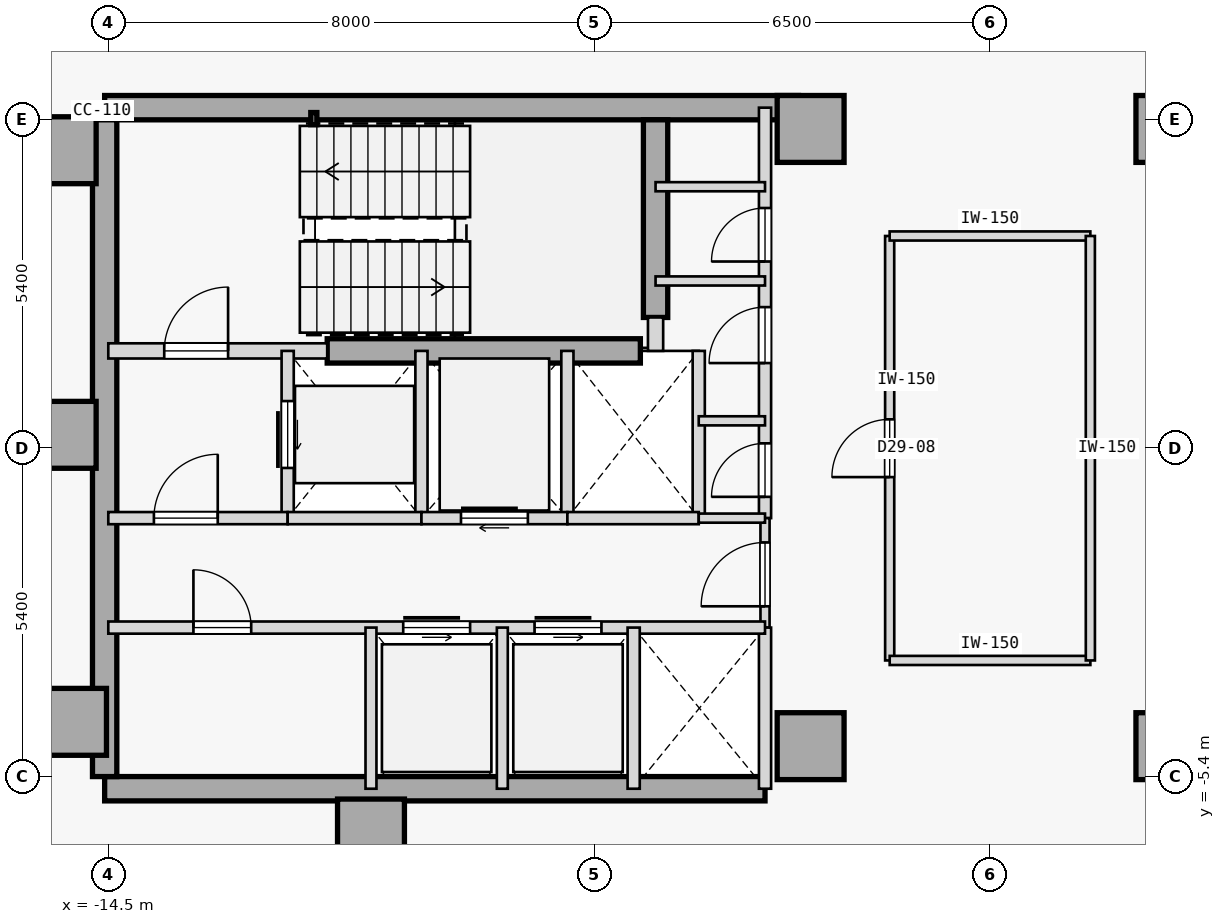
"""IFC4 building model, lengths in metres.
Left out: names, types, materials, properties, quantities, classifications, styles, units other than length and angle.
Written with IfcOpenShell. Run it as: python <this file> out.ifc"""

import sys

from ifc_helpers import new_model, si_unit, direction, frame, frame_2d, origin, origin_2d, place, context, subcontext, project, spatial, rectangle, hollow_rectangle, extrude, element, fill, save


model = new_model("IFC4")
c1 = context("Model", 3, precision=1e-05, world=origin(), true_north=direction((0.0, 1.0)))
c2 = subcontext(c1, "Body", "Model", "MODEL_VIEW")
j1 = project(units=[si_unit("LENGTHUNIT", "METRE"), si_unit("PLANEANGLEUNIT", "RADIAN")], contexts=[c1])
p1 = place(None, origin())
s1 = spatial("IfcSite", under=j1, at=p1, CompositionType="ELEMENT")
p2 = place(p1, origin())
s2 = spatial("IfcBuilding", under=s1, at=p2, CompositionType="ELEMENT")
p3 = place(p2, frame((0.0, 0.0, 117.0)))
s3 = spatial("IfcBuildingStorey", under=s2, at=p3, CompositionType="ELEMENT", Elevation=117.0)
for number, where, z_axis, x_axis in (
    (1, (-15.25, 4.9, 0.0), (0.0, 0.0, 1.0), (1.0, 0.0, 0.0)),
    (2, (-15.25, 0.22, 0.0), (0.0, 0.0, 1.0), (1.0, 0.0, 0.0)),
    (3, (-15.08, -4.5, 0.0), (0.0, 0.0, 1.0), (1.0, 0.0, 0.0)),
    (4, (-10.18, -6.32, 0.0), (0.0, 0.0, 1.0), (1.0, 0.0, 0.0)),
    (5, (-2.95, -4.9, 0.0), (0.0, 0.0, 1.0), (1.0, 0.0, 0.0)),
    (6, (-2.95, 5.25, 0.0), (0.0, 0.0, 1.0), (1.0, 0.0, 0.0)),
    (7, (2.95, -4.9, 0.0), (0.0, 0.0, 1.0), (1.0, 0.0, 0.0)),
    (8, (2.95, 5.25, 0.0), (0.0, 0.0, 1.0), (1.0, 0.0, 0.0)),
):
    element("IfcColumn", number, at=place(p3, frame(where, z_axis=z_axis, x_axis=x_axis)), inside=s3, PredefinedType="COLUMN", context=c2, shape_type="SweptSolid", body=[
        extrude(rectangle(XDim=1.1, YDim=1.1, at=origin_2d()), origin(), (0.0, 0.0, 1.0), 3.7),
    ])
p4 = place(p3, frame((-14.56, 5.6, 0.0), z_axis=(0.0, 0.0, 1.0), x_axis=(1.0, 0.0, 0.0)))
e9 = element("IfcWall", 9, at=p4, inside=s3, PredefinedType="SHEAR", context=c2, shape_type="SweptSolid", body=[
    extrude(rectangle(XDim=11.41, YDim=0.4, at=frame_2d((5.705, 0.0))), origin(), (0.0, 0.0, 1.0), 3.475),
])
p5 = place(p3, frame((-14.56, -5.6, 0.0), z_axis=(0.0, 0.0, 1.0), x_axis=(1.0, 0.0, 0.0)))
e10 = element("IfcWall", 10, at=p5, inside=s3, PredefinedType="SHEAR", context=c2, shape_type="SweptSolid", body=[
    extrude(rectangle(XDim=10.86, YDim=0.4, at=frame_2d((5.43, 0.0))), origin(), (0.0, 0.0, 1.0), 3.475),
])
p6 = place(p3, frame((-14.56, -5.4, 0.0), z_axis=(0.0, 0.0, 1.0), x_axis=(0.0, 1.0, 0.0)))
e11 = element("IfcWall", 11, at=p6, inside=s3, PredefinedType="SHEAR", context=c2, shape_type="SweptSolid", body=[
    extrude(rectangle(XDim=10.8, YDim=0.4, at=frame_2d((5.4, 0.0))), origin(), (0.0, 0.0, 1.0), 3.475),
])
p7 = place(p3, frame((-5.5, 2.15, 0.0), z_axis=(0.0, 0.0, 1.0), x_axis=(0.0, 1.0, 0.0)))
e12 = element("IfcWall", 12, at=p7, inside=s3, PredefinedType="SHEAR", context=c2, shape_type="SweptSolid", body=[
    extrude(rectangle(XDim=3.25, YDim=0.4, at=frame_2d((1.625, 0.0))), origin(), (0.0, 0.0, 1.0), 3.475),
])
p8 = place(p3, frame((-10.9, 1.6, 0.0), z_axis=(0.0, 0.0, 1.0), x_axis=(1.0, 0.0, 0.0)))
e13 = element("IfcWall", 13, at=p8, inside=s3, PredefinedType="SHEAR", context=c2, shape_type="SweptSolid", body=[
    extrude(rectangle(XDim=5.15, YDim=0.4, at=frame_2d((2.575, 0.0))), origin(), (0.0, 0.0, 1.0), 3.475),
])
p9 = place(p3, frame((-11.12, 5.42, 0.0), z_axis=(0.0, 0.0, 1.0), x_axis=(1.0, 0.0, 0.0)))
e14 = element("IfcColumn", 14, at=p9, inside=s3, PredefinedType="COLUMN", context=c2, shape_type="SweptSolid", body=[
    extrude(hollow_rectangle(XDim=0.1, YDim=0.2, WallThickness=0.008, at=origin_2d()), origin(), (0.0, 0.0, 1.0), 3.7),
])
p10 = place(p3, frame((-14.5, 1.6, 0.0), z_axis=(0.0, 0.0, 1.0), x_axis=(1.0, 0.0, 0.0)))
e15 = element("IfcWall", 15, at=p10, inside=s3, PredefinedType="STANDARD", context=c2, shape_type="SweptSolid", body=[
    extrude(rectangle(XDim=3.6, YDim=0.25, at=frame_2d((1.8, 0.0))), origin(), (0.0, 0.0, 1.0), 3.475),
])
p11 = place(p10, frame((0.92, 0.0, 0.0)))
e16 = element("IfcOpeningElement", 16, at=p11, cuts=e15, PredefinedType="OPENING", context=c2, shape_type="SweptSolid", body=[
    extrude(rectangle(XDim=1.05, YDim=2.15, at=frame_2d((0.525, 1.075))), frame((0.0, 0.135, 0.0), z_axis=(0.0, -1.0, 0.0), x_axis=(1.0, 0.0, 0.0)), (0.0, 0.0, 1.0), 0.27),
])
p12 = place(p3, frame((-5.5, 1.6, 0.0), z_axis=(0.0, 0.0, 1.0), x_axis=(0.0, 1.0, 0.0)))
e17 = element("IfcWall", 17, at=p12, inside=s3, PredefinedType="STANDARD", context=c2, shape_type="SweptSolid", body=[
    extrude(rectangle(XDim=0.55, YDim=0.25, at=frame_2d((0.275, 0.0))), origin(), (0.0, 0.0, 1.0), 3.475),
])
p13 = place(p3, frame((-3.7, -1.15, 0.0), z_axis=(0.0, 0.0, 1.0), x_axis=(0.0, 1.0, 0.0)))
e18 = element("IfcWall", 18, at=p13, inside=s3, PredefinedType="STANDARD", context=c2, shape_type="SweptSolid", body=[
    extrude(rectangle(XDim=6.75, YDim=0.2, at=frame_2d((3.375, 0.0))), origin(), (0.0, 0.0, 1.0), 3.475),
])
p14 = place(p13, frame((0.35, 0.0, 0.0)))
e19 = element("IfcOpeningElement", 19, at=p14, cuts=e18, PredefinedType="OPENING", context=c2, shape_type="SweptSolid", body=[
    extrude(rectangle(XDim=0.88, YDim=2.15, at=frame_2d((0.44, 1.075))), frame((0.0, 0.11, 0.0), z_axis=(0.0, -1.0, 0.0), x_axis=(1.0, 0.0, 0.0)), (0.0, 0.0, 1.0), 0.22),
])
p15 = place(p13, frame((2.55, 0.0, 0.0)))
e20 = element("IfcOpeningElement", 20, at=p15, cuts=e18, PredefinedType="OPENING", context=c2, shape_type="SweptSolid", body=[
    extrude(rectangle(XDim=0.92, YDim=2.15, at=frame_2d((0.46, 1.075))), frame((0.0, 0.11, 0.0), z_axis=(0.0, -1.0, 0.0), x_axis=(1.0, 0.0, 0.0)), (0.0, 0.0, 1.0), 0.22),
])
p16 = place(p13, frame((4.22, 0.0, 0.0)))
e21 = element("IfcOpeningElement", 21, at=p16, cuts=e18, PredefinedType="OPENING", context=c2, shape_type="SweptSolid", body=[
    extrude(rectangle(XDim=0.88, YDim=2.15, at=frame_2d((0.44, 1.075))), frame((0.0, 0.11, 0.0), z_axis=(0.0, -1.0, 0.0), x_axis=(1.0, 0.0, 0.0)), (0.0, 0.0, 1.0), 0.22),
])
p17 = place(p3, frame((-3.7, -2.95, 0.0), z_axis=(0.0, 0.0, 1.0), x_axis=(0.0, 1.0, 0.0)))
e22 = element("IfcWall", 22, at=p17, inside=s3, PredefinedType="PARTITIONING", context=c2, shape_type="SweptSolid", body=[
    extrude(rectangle(XDim=1.8, YDim=0.15, at=frame_2d((0.9, 0.0))), origin(), (0.0, 0.0, 1.0), 3.475),
])
p18 = place(p17, frame((0.35, 0.0, 0.0)))
e23 = element("IfcOpeningElement", 23, at=p18, cuts=e22, PredefinedType="OPENING", context=c2, shape_type="SweptSolid", body=[
    extrude(rectangle(XDim=1.05, YDim=2.18, at=frame_2d((0.525, 1.09))), frame((0.0, 0.085, 0.0), z_axis=(0.0, -1.0, 0.0), x_axis=(1.0, 0.0, 0.0)), (0.0, 0.0, 1.0), 0.17),
])
p19 = place(p3, frame((-3.7, -5.6, 0.0), z_axis=(0.0, 0.0, 1.0), x_axis=(0.0, 1.0, 0.0)))
e24 = element("IfcWall", 24, at=p19, inside=s3, PredefinedType="STANDARD", context=c2, shape_type="SweptSolid", body=[
    extrude(rectangle(XDim=2.65, YDim=0.2, at=frame_2d((1.325, 0.0))), origin(), (0.0, 0.0, 1.0), 3.475),
])
p20 = place(p3, frame((-11.55, -1.15, 0.0), z_axis=(0.0, 0.0, 1.0), x_axis=(0.0, 1.0, 0.0)))
e25 = element("IfcWall", 25, at=p20, inside=s3, PredefinedType="STANDARD", context=c2, shape_type="SweptSolid", body=[
    extrude(rectangle(XDim=2.75, YDim=0.2, at=frame_2d((1.375, 0.0))), origin(), (0.0, 0.0, 1.0), 3.475),
])
p21 = place(p20, frame((0.825, 0.0, 0.0)))
e26 = element("IfcOpeningElement", 26, at=p21, cuts=e25, PredefinedType="OPENING", context=c2, shape_type="SweptSolid", body=[
    extrude(rectangle(XDim=1.1, YDim=2.15, at=frame_2d((0.55, 1.075))), frame((0.0, 0.11, 0.0), z_axis=(0.0, -1.0, 0.0), x_axis=(1.0, 0.0, 0.0)), (0.0, 0.0, 1.0), 0.22),
])
p22 = place(p3, frame((-9.35, -1.15, 0.0), z_axis=(0.0, 0.0, 1.0), x_axis=(0.0, 1.0, 0.0)))
e27 = element("IfcWall", 27, at=p22, inside=s3, PredefinedType="STANDARD", context=c2, shape_type="SweptSolid", body=[
    extrude(rectangle(XDim=2.75, YDim=0.2, at=frame_2d((1.375, 0.0))), origin(), (0.0, 0.0, 1.0), 3.475),
])
p23 = place(p3, frame((-14.5, -1.15, 0.0), z_axis=(0.0, 0.0, 1.0), x_axis=(1.0, 0.0, 0.0)))
e28 = element("IfcWall", 28, at=p23, inside=s3, PredefinedType="STANDARD", context=c2, shape_type="SweptSolid", body=[
    extrude(rectangle(XDim=2.95, YDim=0.2, at=frame_2d((1.475, 0.0))), origin(), (0.0, 0.0, 1.0), 3.475),
])
p24 = place(p23, frame((0.75, 0.0, 0.0)))
e29 = element("IfcOpeningElement", 29, at=p24, cuts=e28, PredefinedType="OPENING", context=c2, shape_type="SweptSolid", body=[
    extrude(rectangle(XDim=1.05, YDim=2.18, at=frame_2d((0.525, 1.09))), frame((0.0, 0.11, 0.0), z_axis=(0.0, -1.0, 0.0), x_axis=(1.0, 0.0, 0.0)), (0.0, 0.0, 1.0), 0.22),
])
p25 = place(p3, frame((-11.55, -1.15, 0.0), z_axis=(0.0, 0.0, 1.0), x_axis=(1.0, 0.0, 0.0)))
e30 = element("IfcWall", 30, at=p25, inside=s3, PredefinedType="STANDARD", context=c2, shape_type="SweptSolid", body=[
    extrude(rectangle(XDim=2.2, YDim=0.2, at=frame_2d((1.1, 0.0))), origin(), (0.0, 0.0, 1.0), 3.475),
])
p26 = place(p3, frame((-6.95, -1.15, 0.0), z_axis=(0.0, 0.0, 1.0), x_axis=(0.0, 1.0, 0.0)))
e31 = element("IfcWall", 31, at=p26, inside=s3, PredefinedType="STANDARD", context=c2, shape_type="SweptSolid", body=[
    extrude(rectangle(XDim=2.75, YDim=0.2, at=frame_2d((1.375, 0.0))), origin(), (0.0, 0.0, 1.0), 3.475),
])
p27 = place(p3, frame((-9.35, -1.15, 0.0), z_axis=(0.0, 0.0, 1.0), x_axis=(1.0, 0.0, 0.0)))
e32 = element("IfcWall", 32, at=p27, inside=s3, PredefinedType="STANDARD", context=c2, shape_type="SweptSolid", body=[
    extrude(rectangle(XDim=2.4, YDim=0.2, at=frame_2d((1.2, 0.0))), origin(), (0.0, 0.0, 1.0), 3.475),
])
p28 = place(p27, frame((0.65, 0.0, 0.0)))
e33 = element("IfcOpeningElement", 33, at=p28, cuts=e32, PredefinedType="OPENING", context=c2, shape_type="SweptSolid", body=[
    extrude(rectangle(XDim=1.1, YDim=2.15, at=frame_2d((0.55, 1.075))), frame((0.0, 0.11, 0.0), z_axis=(0.0, -1.0, 0.0), x_axis=(1.0, 0.0, 0.0)), (0.0, 0.0, 1.0), 0.22),
])
p29 = place(p3, frame((-4.79, -1.15, 0.0), z_axis=(0.0, 0.0, 1.0), x_axis=(0.0, 1.0, 0.0)))
e34 = element("IfcWall", 34, at=p29, inside=s3, PredefinedType="STANDARD", context=c2, shape_type="SweptSolid", body=[
    extrude(rectangle(XDim=2.75, YDim=0.2, at=frame_2d((1.375, 0.0))), origin(), (0.0, 0.0, 1.0), 3.475),
])
p30 = place(p3, frame((-6.95, -1.15, 0.0), z_axis=(0.0, 0.0, 1.0), x_axis=(1.0, 0.0, 0.0)))
e35 = element("IfcWall", 35, at=p30, inside=s3, PredefinedType="STANDARD", context=c2, shape_type="SweptSolid", body=[
    extrude(rectangle(XDim=2.16, YDim=0.2, at=frame_2d((1.08, 0.0))), origin(), (0.0, 0.0, 1.0), 3.475),
])
p31 = place(p3, frame((-4.79, -1.15, 0.0), z_axis=(0.0, 0.0, 1.0), x_axis=(1.0, 0.0, 0.0)))
e36 = element("IfcWall", 36, at=p31, inside=s3, PredefinedType="PARTITIONING", context=c2, shape_type="SweptSolid", body=[
    extrude(rectangle(XDim=1.09, YDim=0.15, at=frame_2d((0.545, 0.0))), origin(), (0.0, 0.0, 1.0), 3.475),
])
p32 = place(p3, frame((-14.5, -2.95, 0.0), z_axis=(0.0, 0.0, 1.0), x_axis=(1.0, 0.0, 0.0)))
e37 = element("IfcWall", 37, at=p32, inside=s3, PredefinedType="STANDARD", context=c2, shape_type="SweptSolid", body=[
    extrude(rectangle(XDim=10.8, YDim=0.2, at=frame_2d((5.4, 0.0))), origin(), (0.0, 0.0, 1.0), 3.475),
])
p33 = place(p32, frame((4.85, 0.0, 0.0)))
e38 = element("IfcOpeningElement", 38, at=p33, cuts=e37, PredefinedType="OPENING", context=c2, shape_type="SweptSolid", body=[
    extrude(rectangle(XDim=1.1, YDim=2.15, at=frame_2d((0.55, 1.075))), frame((0.0, 0.11, 0.0), z_axis=(0.0, -1.0, 0.0), x_axis=(1.0, 0.0, 0.0)), (0.0, 0.0, 1.0), 0.22),
])
p34 = place(p32, frame((7.01, 0.0, 0.0)))
e39 = element("IfcOpeningElement", 39, at=p34, cuts=e37, PredefinedType="OPENING", context=c2, shape_type="SweptSolid", body=[
    extrude(rectangle(XDim=1.1, YDim=2.15, at=frame_2d((0.55, 1.075))), frame((0.0, 0.11, 0.0), z_axis=(0.0, -1.0, 0.0), x_axis=(1.0, 0.0, 0.0)), (0.0, 0.0, 1.0), 0.22),
])
p35 = place(p32, frame((1.4, 0.0, 0.0)))
e40 = element("IfcOpeningElement", 40, at=p35, cuts=e37, PredefinedType="OPENING", context=c2, shape_type="SweptSolid", body=[
    extrude(rectangle(XDim=0.95, YDim=2.15, at=frame_2d((0.475, 1.075))), frame((0.0, 0.11, 0.0), z_axis=(0.0, -1.0, 0.0), x_axis=(1.0, 0.0, 0.0)), (0.0, 0.0, 1.0), 0.22),
])
p36 = place(p3, frame((-5.86, -5.6, 0.0), z_axis=(0.0, 0.0, 1.0), x_axis=(0.0, 1.0, 0.0)))
e41 = element("IfcWall", 41, at=p36, inside=s3, PredefinedType="STANDARD", context=c2, shape_type="SweptSolid", body=[
    extrude(rectangle(XDim=2.65, YDim=0.2, at=frame_2d((1.325, 0.0))), origin(), (0.0, 0.0, 1.0), 3.475),
])
for number, where, z_axis, x_axis in (
    (42, (-10.18, -5.6, 0.0), (0.0, 0.0, 1.0), (0.0, 1.0, 0.0)),
    (43, (-8.02, -5.6, 0.0), (0.0, 0.0, 1.0), (0.0, 1.0, 0.0)),
):
    element("IfcWall", number, at=place(p3, frame(where, z_axis=z_axis, x_axis=x_axis)), inside=s3, PredefinedType="STANDARD", context=c2, shape_type="SweptSolid", body=[
        extrude(rectangle(XDim=2.65, YDim=0.18, at=frame_2d((1.325, 0.0))), origin(), (0.0, 0.0, 1.0), 3.475),
    ])
p37 = place(p3, frame((-5.5, 4.3, 0.0), z_axis=(0.0, 0.0, 1.0), x_axis=(1.0, 0.0, 0.0)))
e44 = element("IfcWall", 44, at=p37, inside=s3, PredefinedType="PARTITIONING", context=c2, shape_type="SweptSolid", body=[
    extrude(rectangle(XDim=1.8, YDim=0.15, at=frame_2d((0.9, 0.0))), origin(), (0.0, 0.0, 1.0), 3.475),
])
p38 = place(p3, frame((-4.79, 0.45, 0.0), z_axis=(0.0, 0.0, 1.0), x_axis=(1.0, 0.0, 0.0)))
e45 = element("IfcWall", 45, at=p38, inside=s3, PredefinedType="PARTITIONING", context=c2, shape_type="SweptSolid", body=[
    extrude(rectangle(XDim=1.09, YDim=0.15, at=frame_2d((0.545, 0.0))), origin(), (0.0, 0.0, 1.0), 3.475),
])
p39 = place(p3, frame((-5.5, 2.75, 0.0), z_axis=(0.0, 0.0, 1.0), x_axis=(1.0, 0.0, 0.0)))
e46 = element("IfcWall", 46, at=p39, inside=s3, PredefinedType="PARTITIONING", context=c2, shape_type="SweptSolid", body=[
    extrude(rectangle(XDim=1.8, YDim=0.15, at=frame_2d((0.9, 0.0))), origin(), (0.0, 0.0, 1.0), 3.475),
])
p40 = place(p3, frame((-1.65, -3.49, 0.0), z_axis=(0.0, 0.0, 1.0), x_axis=(-0.000104928124, 0.999999994495, 0.0)))
e47 = element("IfcWall", 47, at=p40, inside=s3, PredefinedType="PARTITIONING", context=c2, shape_type="SweptSolid", body=[
    extrude(rectangle(XDim=6.98, YDim=0.15, at=frame_2d((3.49, 0.0))), origin(), (0.0, 0.0, 1.0), 3.475),
])
p41 = place(p40, frame((3.015, 0.0, 0.0)))
e48 = element("IfcOpeningElement", 48, at=p41, cuts=e47, PredefinedType="OPENING", context=c2, shape_type="SweptSolid", body=[
    extrude(rectangle(XDim=0.95, YDim=2.15, at=frame_2d((0.475, 1.075))), frame((0.0, 0.085, 0.0), z_axis=(0.0, -1.0, 0.0), x_axis=(1.0, 0.0, 0.0)), (0.0, 0.0, 1.0), 0.17),
])
p42 = place(p3, frame((-1.65, -3.49, 0.0), z_axis=(0.0, 0.0, 1.0), x_axis=(1.0, 0.0, 0.0)))
e49 = element("IfcWall", 49, at=p42, inside=s3, PredefinedType="PARTITIONING", context=c2, shape_type="SweptSolid", body=[
    extrude(rectangle(XDim=3.3, YDim=0.15, at=frame_2d((1.65, 0.0))), origin(), (0.0, 0.0, 1.0), 3.475),
])
p43 = place(p3, frame((-1.65, 3.49, 0.0), z_axis=(0.0, 0.0, 1.0), x_axis=(1.0, 0.0, 0.0)))
e50 = element("IfcWall", 50, at=p43, inside=s3, PredefinedType="PARTITIONING", context=c2, shape_type="SweptSolid", body=[
    extrude(rectangle(XDim=3.3, YDim=0.15, at=frame_2d((1.65, 0.0))), origin(), (0.0, 0.0, 1.0), 3.475),
])
p44 = place(p3, frame((1.65, -3.49, 0.0), z_axis=(0.0, 0.0, 1.0), x_axis=(-6.9952083e-05, 0.999999997553, 0.0)))
e51 = element("IfcWall", 51, at=p44, inside=s3, PredefinedType="PARTITIONING", context=c2, shape_type="SweptSolid", body=[
    extrude(rectangle(XDim=6.98, YDim=0.15, at=frame_2d((3.49, 0.0))), origin(), (0.0, 0.0, 1.0), 3.475),
])
p45 = place(p11, origin())
e52 = element("IfcDoor", 52, at=p45, inside=s3, OperationType="SINGLE_SWING_RIGHT", PredefinedType="DOOR", context=c2, shape_type="SweptSolid", body=[
    extrude(rectangle(XDim=1.05, YDim=2.15, at=frame_2d((0.525, 1.075))), frame((0.0, 0.025, 0.0), z_axis=(0.0, -1.0, 0.0), x_axis=(1.0, 0.0, 0.0)), (0.0, 0.0, 1.0), 0.05),
])
fill(e16, e52)
p46 = place(p24, origin())
e53 = element("IfcDoor", 53, at=p46, inside=s3, OperationType="SINGLE_SWING_RIGHT", PredefinedType="DOOR", context=c2, shape_type="SweptSolid", body=[
    extrude(rectangle(XDim=1.05, YDim=2.18, at=frame_2d((0.525, 1.09))), frame((0.0, 0.025, 0.0), z_axis=(0.0, -1.0, 0.0), x_axis=(1.0, 0.0, 0.0)), (0.0, 0.0, 1.0), 0.05),
])
fill(e29, e53)
p47 = place(p18, origin())
e54 = element("IfcDoor", 54, at=p47, inside=s3, OperationType="SINGLE_SWING_LEFT", PredefinedType="DOOR", context=c2, shape_type="SweptSolid", body=[
    extrude(rectangle(XDim=1.05, YDim=2.18, at=frame_2d((0.525, 1.09))), frame((0.0, 0.025, 0.0), z_axis=(0.0, -1.0, 0.0), x_axis=(1.0, 0.0, 0.0)), (0.0, 0.0, 1.0), 0.05),
])
fill(e23, e54)
p48 = place(p21, origin())
e55 = element("IfcDoor", 55, at=p48, inside=s3, OperationType="SLIDING_TO_RIGHT", PredefinedType="DOOR", context=c2, shape_type="SweptSolid", body=[
    extrude(rectangle(XDim=1.1, YDim=2.15, at=frame_2d((0.55, 1.075))), frame((0.0, 0.025, 0.0), z_axis=(0.0, -1.0, 0.0), x_axis=(1.0, 0.0, 0.0)), (0.0, 0.0, 1.0), 0.05),
])
fill(e26, e55)
p49 = place(p28, origin())
e56 = element("IfcDoor", 56, at=p49, inside=s3, OperationType="SLIDING_TO_RIGHT", PredefinedType="DOOR", context=c2, shape_type="SweptSolid", body=[
    extrude(rectangle(XDim=1.1, YDim=2.15, at=frame_2d((0.55, 1.075))), frame((0.0, 0.025, 0.0), z_axis=(0.0, -1.0, 0.0), x_axis=(1.0, 0.0, 0.0)), (0.0, 0.0, 1.0), 0.05),
])
fill(e33, e56)
p50 = place(p33, origin())
e57 = element("IfcDoor", 57, at=p50, inside=s3, OperationType="SLIDING_TO_LEFT", PredefinedType="DOOR", context=c2, shape_type="SweptSolid", body=[
    extrude(rectangle(XDim=1.1, YDim=2.15, at=frame_2d((0.55, 1.075))), frame((0.0, 0.025, 0.0), z_axis=(0.0, -1.0, 0.0), x_axis=(1.0, 0.0, 0.0)), (0.0, 0.0, 1.0), 0.05),
])
fill(e38, e57)
p51 = place(p34, origin())
e58 = element("IfcDoor", 58, at=p51, inside=s3, OperationType="SLIDING_TO_LEFT", PredefinedType="DOOR", context=c2, shape_type="SweptSolid", body=[
    extrude(rectangle(XDim=1.1, YDim=2.15, at=frame_2d((0.55, 1.075))), frame((0.0, 0.025, 0.0), z_axis=(0.0, -1.0, 0.0), x_axis=(1.0, 0.0, 0.0)), (0.0, 0.0, 1.0), 0.05),
])
fill(e39, e58)
p52 = place(p35, origin())
e59 = element("IfcDoor", 59, at=p52, inside=s3, OperationType="SINGLE_SWING_LEFT", PredefinedType="DOOR", context=c2, shape_type="SweptSolid", body=[
    extrude(rectangle(XDim=0.95, YDim=2.15, at=frame_2d((0.475, 1.075))), frame((0.0, 0.025, 0.0), z_axis=(0.0, -1.0, 0.0), x_axis=(1.0, 0.0, 0.0)), (0.0, 0.0, 1.0), 0.05),
])
fill(e40, e59)
p53 = place(p14, origin())
e60 = element("IfcDoor", 60, at=p53, inside=s3, OperationType="SINGLE_SWING_LEFT", PredefinedType="DOOR", context=c2, shape_type="SweptSolid", body=[
    extrude(rectangle(XDim=0.88, YDim=2.15, at=frame_2d((0.44, 1.075))), frame((0.0, 0.025, 0.0), z_axis=(0.0, -1.0, 0.0), x_axis=(1.0, 0.0, 0.0)), (0.0, 0.0, 1.0), 0.05),
])
fill(e19, e60)
p54 = place(p15, origin())
e61 = element("IfcDoor", 61, at=p54, inside=s3, OperationType="SINGLE_SWING_LEFT", PredefinedType="DOOR", context=c2, shape_type="SweptSolid", body=[
    extrude(rectangle(XDim=0.92, YDim=2.15, at=frame_2d((0.46, 1.075))), frame((0.0, 0.025, 0.0), z_axis=(0.0, -1.0, 0.0), x_axis=(1.0, 0.0, 0.0)), (0.0, 0.0, 1.0), 0.05),
])
fill(e20, e61)
p55 = place(p16, origin())
e62 = element("IfcDoor", 62, at=p55, inside=s3, OperationType="SINGLE_SWING_LEFT", PredefinedType="DOOR", context=c2, shape_type="SweptSolid", body=[
    extrude(rectangle(XDim=0.88, YDim=2.15, at=frame_2d((0.44, 1.075))), frame((0.0, 0.025, 0.0), z_axis=(0.0, -1.0, 0.0), x_axis=(1.0, 0.0, 0.0)), (0.0, 0.0, 1.0), 0.05),
])
fill(e21, e62)
p56 = place(p41, origin())
e63 = element("IfcDoor", 63, at=p56, inside=s3, OperationType="SINGLE_SWING_LEFT", PredefinedType="DOOR", context=c2, shape_type="SweptSolid", body=[
    extrude(rectangle(XDim=0.95, YDim=2.15, at=frame_2d((0.475, 1.075))), frame((0.0, 0.025, 0.0), z_axis=(0.0, -1.0, 0.0), x_axis=(1.0, 0.0, 0.0)), (0.0, 0.0, 1.0), 0.05),
])
fill(e48, e63)
save(model, sys.argv[1])
